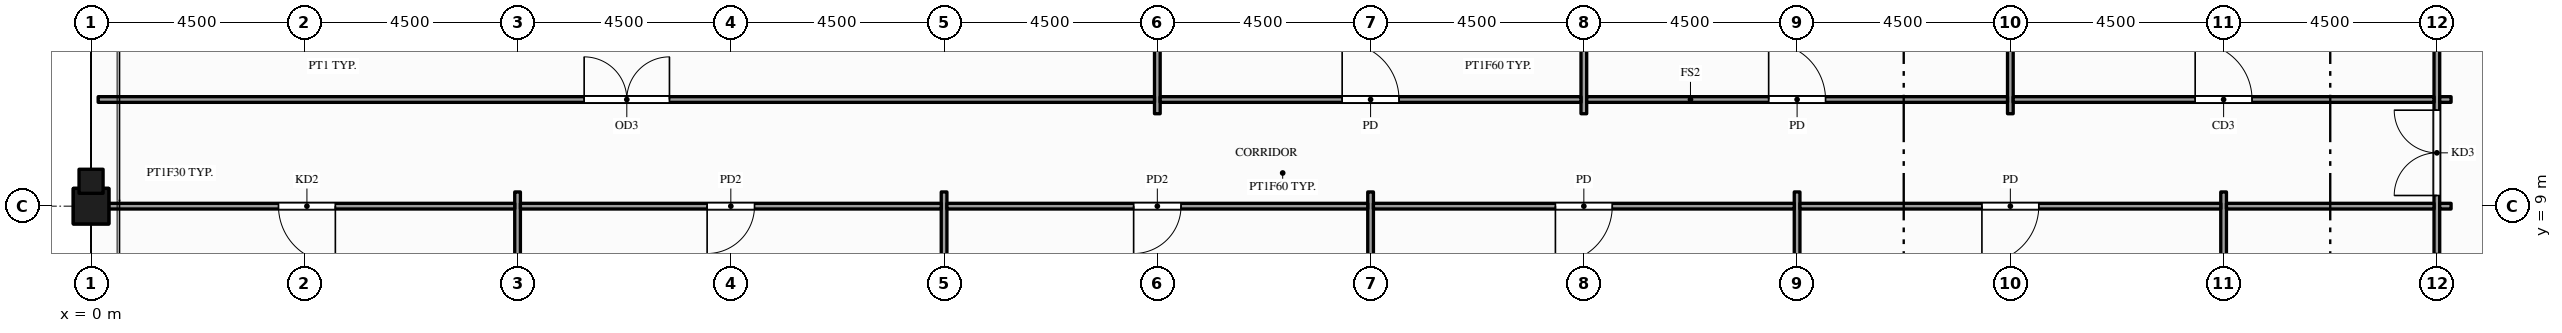
"""IFC4 building model, lengths in metres.
Left out: names, types, materials, properties, quantities, classifications, styles, units other than length and angle.
Written with IfcOpenShell. Run it as: python <this file> out.ifc"""

import sys

from ifc_helpers import new_model, si_unit, direction, frame, frame_2d, origin, origin_2d, place, context, subcontext, project, spatial, rectangle, hollow_rectangle, extrude, element, fill, save


model = new_model("IFC4")
c1 = context("Model", 3, precision=1e-05, world=origin(), true_north=direction((0.0, 1.0)))
c2 = subcontext(c1, "Body", "Model", "MODEL_VIEW")
j1 = project(units=[si_unit("LENGTHUNIT", "METRE"), si_unit("PLANEANGLEUNIT", "RADIAN")], contexts=[c1])
p1 = place(None, origin())
s1 = spatial("IfcSite", under=j1, at=p1, CompositionType="ELEMENT")
p2 = place(p1, origin())
s2 = spatial("IfcBuilding", under=s1, at=p2, CompositionType="ELEMENT")
p3 = place(p2, frame((0.0, 0.0, 243.0)))
s3 = spatial("IfcBuildingStorey", under=s2, at=p3, CompositionType="ELEMENT", Elevation=243.0)
p4 = place(p3, frame((0.0, 9.0, -0.25), z_axis=(0.0, 0.0, 1.0), x_axis=(1.0, 0.0, 0.0)))
e1 = element("IfcColumn", 1, at=p4, inside=s3, PredefinedType="COLUMN", context=c2, shape_type="SweptSolid", body=[
    extrude(hollow_rectangle(XDim=0.75, YDim=0.75, WallThickness=0.036, at=origin_2d()), origin(), (0.0, 0.0, 1.0), 4.6),
])
p5 = place(p3, frame((0.0, 9.0, 4.35), z_axis=(0.0, 0.0, 1.0), x_axis=(1.0, 0.0, 0.0)))
e2 = element("IfcColumn", 2, at=p5, inside=s3, PredefinedType="COLUMN", context=c2, shape_type="SweptSolid", body=[
    extrude(rectangle(XDim=0.75, YDim=0.75, at=origin_2d()), origin(), (0.0, 0.0, 1.0), 1.5),
])
p6 = place(p3, frame((9.0, 3.875, 0.0), z_axis=(0.0, 0.0, 1.0), x_axis=(0.0, 1.0, 0.0)))
e3 = element("IfcWall", 3, at=p6, inside=s3, PredefinedType="PARTITIONING", context=c2, shape_type="SweptSolid", body=[
    extrude(rectangle(XDim=5.425, YDim=0.12, at=frame_2d((2.712, 0.0))), origin(), (0.0, 0.0, 1.0), 4.87),
])
p7 = place(p3, frame((18.0, 0.15, 0.0), z_axis=(0.0, 0.0, 1.0), x_axis=(0.0, 1.0, 0.0)))
e4 = element("IfcWall", 4, at=p7, inside=s3, PredefinedType="PARTITIONING", context=c2, shape_type="SweptSolid", body=[
    extrude(rectangle(XDim=9.15, YDim=0.12, at=frame_2d((4.575, 0.0))), origin(), (0.0, 0.0, 1.0), 4.87),
])
p8 = place(p3, frame((22.5, 10.95, 0.0), z_axis=(0.0, 0.0, 1.0), x_axis=(0.0, 1.0, 0.0)))
e5 = element("IfcWall", 5, at=p8, inside=s3, PredefinedType="PARTITIONING", context=c2, shape_type="SweptSolid", body=[
    extrude(rectangle(XDim=11.4, YDim=0.12, at=frame_2d((5.7, 0.0))), origin(), (0.0, 0.0, 1.0), 4.87),
])
p9 = place(p3, frame((27.0, 0.15, 0.0), z_axis=(0.0, 0.0, 1.0), x_axis=(0.0, 1.0, 0.0)))
e6 = element("IfcWall", 6, at=p9, inside=s3, PredefinedType="PARTITIONING", context=c2, shape_type="SweptSolid", body=[
    extrude(rectangle(XDim=9.15, YDim=0.12, at=frame_2d((4.575, 0.0))), origin(), (0.0, 0.0, 1.0), 4.45),
])
p10 = place(p3, frame((31.5, 10.95, 0.0), z_axis=(0.0, 0.0, 1.0), x_axis=(0.0, 1.0, 0.0)))
e7 = element("IfcWall", 7, at=p10, inside=s3, PredefinedType="PARTITIONING", context=c2, shape_type="SweptSolid", body=[
    extrude(rectangle(XDim=11.4, YDim=0.12, at=frame_2d((5.7, 0.0))), origin(), (0.0, 0.0, 1.0), 4.87),
])
p11 = place(p3, frame((36.0, 0.15, 0.0), z_axis=(0.0, 0.0, 1.0), x_axis=(0.0, 1.0, 0.0)))
e8 = element("IfcWall", 8, at=p11, inside=s3, PredefinedType="PARTITIONING", context=c2, shape_type="SweptSolid", body=[
    extrude(rectangle(XDim=9.15, YDim=0.12, at=frame_2d((4.575, 0.0))), origin(), (0.0, 0.0, 1.0), 4.45),
])
p12 = place(p3, frame((40.5, 10.95, 0.0), z_axis=(0.0, 0.0, 1.0), x_axis=(0.0, 1.0, 0.0)))
e9 = element("IfcWall", 9, at=p12, inside=s3, PredefinedType="PARTITIONING", context=c2, shape_type="SweptSolid", body=[
    extrude(rectangle(XDim=11.4, YDim=0.12, at=frame_2d((5.7, 0.0))), origin(), (0.0, 0.0, 1.0), 4.87),
])
p13 = place(p3, frame((45.0, 0.15, 0.0), z_axis=(0.0, 0.0, 1.0), x_axis=(0.0, 1.0, 0.0)))
e10 = element("IfcWall", 10, at=p13, inside=s3, PredefinedType="PARTITIONING", context=c2, shape_type="SweptSolid", body=[
    extrude(rectangle(XDim=9.15, YDim=0.12, at=frame_2d((4.575, 0.0))), origin(), (0.0, 0.0, 1.0), 4.45),
])
p14 = place(p3, frame((49.5, 0.15, 0.0), z_axis=(0.0, 0.0, 1.0), x_axis=(0.0, 1.0, 0.0)))
e11 = element("IfcWall", 11, at=p14, inside=s3, PredefinedType="PARTITIONING", context=c2, shape_type="SweptSolid", body=[
    extrude(rectangle(XDim=22.2, YDim=0.12, at=frame_2d((11.1, 0.0))), origin(), (0.0, 0.0, 1.0), 4.45),
])
p15 = place(p14, frame((9.075, 0.0, 0.0)))
e12 = element("IfcOpeningElement", 12, at=p15, cuts=e11, PredefinedType="OPENING", context=c2, shape_type="SweptSolid", body=[
    extrude(rectangle(XDim=1.8, YDim=2.1, at=frame_2d((0.9, 1.05))), frame((0.0, 0.07, 0.0), z_axis=(0.0, -1.0, 0.0), x_axis=(1.0, 0.0, 0.0)), (0.0, 0.0, 1.0), 0.14),
])
p16 = place(p14, frame((0.85, 0.0, 0.0)))
e13 = element("IfcOpeningElement", 13, at=p16, cuts=e11, PredefinedType="OPENING", context=c2, shape_type="SweptSolid", body=[
    extrude(rectangle(XDim=0.9, YDim=2.1, at=frame_2d((0.45, 1.05))), frame((0.0, 0.07, 0.0), z_axis=(0.0, -1.0, 0.0), x_axis=(1.0, 0.0, 0.0)), (0.0, 0.0, 1.0), 0.14),
])
p17 = place(p14, frame((3.9, 0.0, 0.0)))
e14 = element("IfcOpeningElement", 14, at=p17, cuts=e11, PredefinedType="OPENING", context=c2, shape_type="SweptSolid", body=[
    extrude(rectangle(XDim=0.9, YDim=2.1, at=frame_2d((0.45, 1.05))), frame((0.0, 0.07, 0.0), z_axis=(0.0, -1.0, 0.0), x_axis=(1.0, 0.0, 0.0)), (0.0, 0.0, 1.0), 0.14),
])
p18 = place(p14, frame((6.85, 0.0, 0.0)))
e15 = element("IfcOpeningElement", 15, at=p18, cuts=e11, PredefinedType="OPENING", context=c2, shape_type="SweptSolid", body=[
    extrude(rectangle(XDim=1.0, YDim=2.1, at=frame_2d((0.5, 1.05))), frame((0.0, 0.07, 0.0), z_axis=(0.0, -1.0, 0.0), x_axis=(1.0, 0.0, 0.0)), (0.0, 0.0, 1.0), 0.14),
])
p19 = place(p3, frame((0.15, 9.0, 0.0), z_axis=(0.0, 0.0, 1.0), x_axis=(1.0, 0.0, 0.0)))
e16 = element("IfcWall", 16, at=p19, inside=s3, PredefinedType="PARTITIONING", context=c2, shape_type="SweptSolid", body=[
    extrude(rectangle(XDim=8.79, YDim=0.12, at=frame_2d((4.395, 0.0))), origin(), (0.0, 0.0, 1.0), 4.87),
])
p20 = place(p19, frame((3.805, 0.0, 0.0)))
e17 = element("IfcOpeningElement", 17, at=p20, cuts=e16, PredefinedType="OPENING", context=c2, shape_type="SweptSolid", body=[
    extrude(rectangle(XDim=1.2, YDim=2.1, at=frame_2d((0.6, 1.05))), frame((0.0, 0.07, 0.0), z_axis=(0.0, -1.0, 0.0), x_axis=(1.0, 0.0, 0.0)), (0.0, 0.0, 1.0), 0.14),
])
p21 = place(p3, frame((9.06, 9.0, 0.0), z_axis=(0.0, 0.0, 1.0), x_axis=(1.0, 0.0, 0.0)))
e18 = element("IfcWall", 18, at=p21, inside=s3, PredefinedType="PARTITIONING", context=c2, shape_type="SweptSolid", body=[
    extrude(rectangle(XDim=8.88, YDim=0.12, at=frame_2d((4.44, 0.0))), origin(), (0.0, 0.0, 1.0), 4.87),
])
p22 = place(p21, frame((3.94, 0.0, 0.0)))
e19 = element("IfcOpeningElement", 19, at=p22, cuts=e18, PredefinedType="OPENING", context=c2, shape_type="SweptSolid", body=[
    extrude(rectangle(XDim=1.0, YDim=2.1, at=frame_2d((0.5, 1.05))), frame((0.0, 0.07, 0.0), z_axis=(0.0, -1.0, 0.0), x_axis=(1.0, 0.0, 0.0)), (0.0, 0.0, 1.0), 0.14),
])
p23 = place(p3, frame((18.06, 9.0, 0.0), z_axis=(0.0, 0.0, 1.0), x_axis=(1.0, 0.0, 0.0)))
e20 = element("IfcWall", 20, at=p23, inside=s3, PredefinedType="PARTITIONING", context=c2, shape_type="SweptSolid", body=[
    extrude(rectangle(XDim=8.88, YDim=0.12, at=frame_2d((4.44, 0.0))), origin(), (0.0, 0.0, 1.0), 4.87),
])
p24 = place(p23, frame((3.94, 0.0, 0.0)))
e21 = element("IfcOpeningElement", 21, at=p24, cuts=e20, PredefinedType="OPENING", context=c2, shape_type="SweptSolid", body=[
    extrude(rectangle(XDim=1.0, YDim=2.1, at=frame_2d((0.5, 1.05))), frame((0.0, 0.07, 0.0), z_axis=(0.0, -1.0, 0.0), x_axis=(1.0, 0.0, 0.0)), (0.0, 0.0, 1.0), 0.14),
])
p25 = place(p3, frame((27.06, 9.0, 0.0), z_axis=(0.0, 0.0, 1.0), x_axis=(1.0, 0.0, 0.0)))
e22 = element("IfcWall", 22, at=p25, inside=s3, PredefinedType="PARTITIONING", context=c2, shape_type="SweptSolid", body=[
    extrude(rectangle(XDim=8.88, YDim=0.12, at=frame_2d((4.44, 0.0))), origin(), (0.0, 0.0, 1.0), 4.87),
])
p26 = place(p25, frame((3.84, 0.0, 0.0)))
e23 = element("IfcOpeningElement", 23, at=p26, cuts=e22, PredefinedType="OPENING", context=c2, shape_type="SweptSolid", body=[
    extrude(rectangle(XDim=1.2, YDim=2.1, at=frame_2d((0.6, 1.05))), frame((0.0, 0.07, 0.0), z_axis=(0.0, -1.0, 0.0), x_axis=(1.0, 0.0, 0.0)), (0.0, 0.0, 1.0), 0.14),
])
p27 = place(p3, frame((36.06, 9.0, 0.0), z_axis=(0.0, 0.0, 1.0), x_axis=(1.0, 0.0, 0.0)))
e24 = element("IfcWall", 24, at=p27, inside=s3, PredefinedType="PARTITIONING", context=c2, shape_type="SweptSolid", body=[
    extrude(rectangle(XDim=8.88, YDim=0.12, at=frame_2d((4.44, 0.0))), origin(), (0.0, 0.0, 1.0), 4.87),
])
p28 = place(p27, frame((3.84, 0.0, 0.0)))
e25 = element("IfcOpeningElement", 25, at=p28, cuts=e24, PredefinedType="OPENING", context=c2, shape_type="SweptSolid", body=[
    extrude(rectangle(XDim=1.2, YDim=2.1, at=frame_2d((0.6, 1.05))), frame((0.0, 0.07, 0.0), z_axis=(0.0, -1.0, 0.0), x_axis=(1.0, 0.0, 0.0)), (0.0, 0.0, 1.0), 0.14),
])
p29 = place(p3, frame((45.06, 9.0, 0.0), z_axis=(0.0, 0.0, 1.0), x_axis=(1.0, 0.0, 0.0)))
e26 = element("IfcWall", 26, at=p29, inside=s3, PredefinedType="PARTITIONING", context=c2, shape_type="SweptSolid", body=[
    extrude(rectangle(XDim=4.38, YDim=0.12, at=frame_2d((2.19, 0.0))), origin(), (0.0, 0.0, 1.0), 4.87),
])
p30 = place(p3, frame((49.56, 9.0, 0.0), z_axis=(0.0, 0.0, 1.0), x_axis=(1.0, 0.0, 0.0)))
e27 = element("IfcWall", 27, at=p30, inside=s3, PredefinedType="PARTITIONING", context=c2, shape_type="SweptSolid", body=[
    extrude(rectangle(XDim=0.24, YDim=0.12, at=frame_2d((0.12, 0.0))), origin(), (0.0, 0.0, 1.0), 4.87),
])
p31 = place(p3, frame((0.15, 11.25, 0.0), z_axis=(0.0, 0.0, 1.0), x_axis=(1.0, 0.0, 0.0)))
e28 = element("IfcWall", 28, at=p31, inside=s3, PredefinedType="PARTITIONING", context=c2, shape_type="SweptSolid", body=[
    extrude(rectangle(XDim=22.29, YDim=0.12, at=frame_2d((11.145, 0.0))), origin(), (0.0, 0.0, 1.0), 4.87),
])
p32 = place(p31, frame((10.255, 0.0, 0.0)))
e29 = element("IfcOpeningElement", 29, at=p32, cuts=e28, PredefinedType="OPENING", context=c2, shape_type="SweptSolid", body=[
    extrude(rectangle(XDim=1.8, YDim=2.1, at=frame_2d((0.9, 1.05))), frame((0.0, 0.07, 0.0), z_axis=(0.0, -1.0, 0.0), x_axis=(1.0, 0.0, 0.0)), (0.0, 0.0, 1.0), 0.14),
])
p33 = place(p3, frame((22.56, 11.25, 0.0), z_axis=(0.0, 0.0, 1.0), x_axis=(1.0, 0.0, 0.0)))
e30 = element("IfcWall", 30, at=p33, inside=s3, PredefinedType="PARTITIONING", context=c2, shape_type="SweptSolid", body=[
    extrude(rectangle(XDim=8.88, YDim=0.12, at=frame_2d((4.44, 0.0))), origin(), (0.0, 0.0, 1.0), 4.87),
])
p34 = place(p33, frame((3.84, 0.0, 0.0)))
e31 = element("IfcOpeningElement", 31, at=p34, cuts=e30, PredefinedType="OPENING", context=c2, shape_type="SweptSolid", body=[
    extrude(rectangle(XDim=1.2, YDim=2.1, at=frame_2d((0.6, 1.05))), frame((0.0, 0.07, 0.0), z_axis=(0.0, -1.0, 0.0), x_axis=(1.0, 0.0, 0.0)), (0.0, 0.0, 1.0), 0.14),
])
p35 = place(p3, frame((31.56, 11.25, 0.0), z_axis=(0.0, 0.0, 1.0), x_axis=(1.0, 0.0, 0.0)))
e32 = element("IfcWall", 32, at=p35, inside=s3, PredefinedType="PARTITIONING", context=c2, shape_type="SweptSolid", body=[
    extrude(rectangle(XDim=8.88, YDim=0.12, at=frame_2d((4.44, 0.0))), origin(), (0.0, 0.0, 1.0), 4.87),
])
p36 = place(p35, frame((3.84, 0.0, 0.0)))
e33 = element("IfcOpeningElement", 33, at=p36, cuts=e32, PredefinedType="OPENING", context=c2, shape_type="SweptSolid", body=[
    extrude(rectangle(XDim=1.2, YDim=2.1, at=frame_2d((0.6, 1.05))), frame((0.0, 0.07, 0.0), z_axis=(0.0, -1.0, 0.0), x_axis=(1.0, 0.0, 0.0)), (0.0, 0.0, 1.0), 0.14),
])
p37 = place(p3, frame((40.56, 11.25, 0.0), z_axis=(0.0, 0.0, 1.0), x_axis=(1.0, 0.0, 0.0)))
e34 = element("IfcWall", 34, at=p37, inside=s3, PredefinedType="PARTITIONING", context=c2, shape_type="SweptSolid", body=[
    extrude(rectangle(XDim=8.88, YDim=0.12, at=frame_2d((4.44, 0.0))), origin(), (0.0, 0.0, 1.0), 4.87),
])
p38 = place(p37, frame((3.84, 0.0, 0.0)))
e35 = element("IfcOpeningElement", 35, at=p38, cuts=e34, PredefinedType="OPENING", context=c2, shape_type="SweptSolid", body=[
    extrude(rectangle(XDim=1.2, YDim=2.1, at=frame_2d((0.6, 1.05))), frame((0.0, 0.07, 0.0), z_axis=(0.0, -1.0, 0.0), x_axis=(1.0, 0.0, 0.0)), (0.0, 0.0, 1.0), 0.14),
])
p39 = place(p3, frame((49.56, 11.25, 0.0), z_axis=(0.0, 0.0, 1.0), x_axis=(1.0, 0.0, 0.0)))
e36 = element("IfcWall", 36, at=p39, inside=s3, PredefinedType="PARTITIONING", context=c2, shape_type="SweptSolid", body=[
    extrude(rectangle(XDim=0.24, YDim=0.12, at=frame_2d((0.12, 0.0))), origin(), (0.0, 0.0, 1.0), 4.87),
])
p40 = place(p15, origin())
e37 = element("IfcDoor", 37, at=p40, inside=s3, OperationType="DOUBLE_DOOR_SINGLE_SWING", PredefinedType="DOOR", context=c2, shape_type="SweptSolid", body=[
    extrude(rectangle(XDim=1.8, YDim=2.1, at=frame_2d((0.9, 1.05))), frame((0.0, 0.025, 0.0), z_axis=(0.0, -1.0, 0.0), x_axis=(1.0, 0.0, 0.0)), (0.0, 0.0, 1.0), 0.05),
])
fill(e12, e37)
p41 = place(p20, origin())
e38 = element("IfcDoor", 38, at=p41, inside=s3, OperationType="SINGLE_SWING_RIGHT", PredefinedType="DOOR", context=c2, shape_type="SweptSolid", body=[
    extrude(rectangle(XDim=1.2, YDim=2.1, at=frame_2d((0.6, 1.05))), frame((0.0, 0.025, 0.0), z_axis=(0.0, -1.0, 0.0), x_axis=(1.0, 0.0, 0.0)), (0.0, 0.0, 1.0), 0.05),
])
fill(e17, e38)
p42 = place(p22, origin())
e39 = element("IfcDoor", 39, at=p42, inside=s3, OperationType="SINGLE_SWING_LEFT", PredefinedType="DOOR", context=c2, shape_type="SweptSolid", body=[
    extrude(rectangle(XDim=1.0, YDim=2.1, at=frame_2d((0.5, 1.05))), frame((0.0, 0.025, 0.0), z_axis=(0.0, -1.0, 0.0), x_axis=(1.0, 0.0, 0.0)), (0.0, 0.0, 1.0), 0.05),
])
fill(e19, e39)
p43 = place(p24, origin())
e40 = element("IfcDoor", 40, at=p43, inside=s3, OperationType="SINGLE_SWING_LEFT", PredefinedType="DOOR", context=c2, shape_type="SweptSolid", body=[
    extrude(rectangle(XDim=1.0, YDim=2.1, at=frame_2d((0.5, 1.05))), frame((0.0, 0.025, 0.0), z_axis=(0.0, -1.0, 0.0), x_axis=(1.0, 0.0, 0.0)), (0.0, 0.0, 1.0), 0.05),
])
fill(e21, e40)
p44 = place(p26, origin())
e41 = element("IfcDoor", 41, at=p44, inside=s3, OperationType="SINGLE_SWING_LEFT", PredefinedType="DOOR", context=c2, shape_type="SweptSolid", body=[
    extrude(rectangle(XDim=1.2, YDim=2.1, at=frame_2d((0.6, 1.05))), frame((0.0, 0.025, 0.0), z_axis=(0.0, -1.0, 0.0), x_axis=(1.0, 0.0, 0.0)), (0.0, 0.0, 1.0), 0.05),
])
fill(e23, e41)
p45 = place(p28, origin())
e42 = element("IfcDoor", 42, at=p45, inside=s3, OperationType="SINGLE_SWING_LEFT", PredefinedType="DOOR", context=c2, shape_type="SweptSolid", body=[
    extrude(rectangle(XDim=1.2, YDim=2.1, at=frame_2d((0.6, 1.05))), frame((0.0, 0.025, 0.0), z_axis=(0.0, -1.0, 0.0), x_axis=(1.0, 0.0, 0.0)), (0.0, 0.0, 1.0), 0.05),
])
fill(e25, e42)
p46 = place(p32, origin())
e43 = element("IfcDoor", 43, at=p46, inside=s3, OperationType="DOUBLE_DOOR_SINGLE_SWING", PredefinedType="DOOR", context=c2, shape_type="SweptSolid", body=[
    extrude(rectangle(XDim=1.8, YDim=2.1, at=frame_2d((0.9, 1.05))), frame((0.0, 0.025, 0.0), z_axis=(0.0, -1.0, 0.0), x_axis=(1.0, 0.0, 0.0)), (0.0, 0.0, 1.0), 0.05),
])
fill(e29, e43)
p47 = place(p34, origin())
e44 = element("IfcDoor", 44, at=p47, inside=s3, OperationType="SINGLE_SWING_LEFT", PredefinedType="DOOR", context=c2, shape_type="SweptSolid", body=[
    extrude(rectangle(XDim=1.2, YDim=2.1, at=frame_2d((0.6, 1.05))), frame((0.0, 0.025, 0.0), z_axis=(0.0, -1.0, 0.0), x_axis=(1.0, 0.0, 0.0)), (0.0, 0.0, 1.0), 0.05),
])
fill(e31, e44)
p48 = place(p36, origin())
e45 = element("IfcDoor", 45, at=p48, inside=s3, OperationType="SINGLE_SWING_LEFT", PredefinedType="DOOR", context=c2, shape_type="SweptSolid", body=[
    extrude(rectangle(XDim=1.2, YDim=2.1, at=frame_2d((0.6, 1.05))), frame((0.0, 0.025, 0.0), z_axis=(0.0, -1.0, 0.0), x_axis=(1.0, 0.0, 0.0)), (0.0, 0.0, 1.0), 0.05),
])
fill(e33, e45)
p49 = place(p38, origin())
e46 = element("IfcDoor", 46, at=p49, inside=s3, OperationType="SINGLE_SWING_LEFT", PredefinedType="DOOR", context=c2, shape_type="SweptSolid", body=[
    extrude(rectangle(XDim=1.2, YDim=2.1, at=frame_2d((0.6, 1.05))), frame((0.0, 0.025, 0.0), z_axis=(0.0, -1.0, 0.0), x_axis=(1.0, 0.0, 0.0)), (0.0, 0.0, 1.0), 0.05),
])
fill(e35, e46)
save(model, sys.argv[1])
